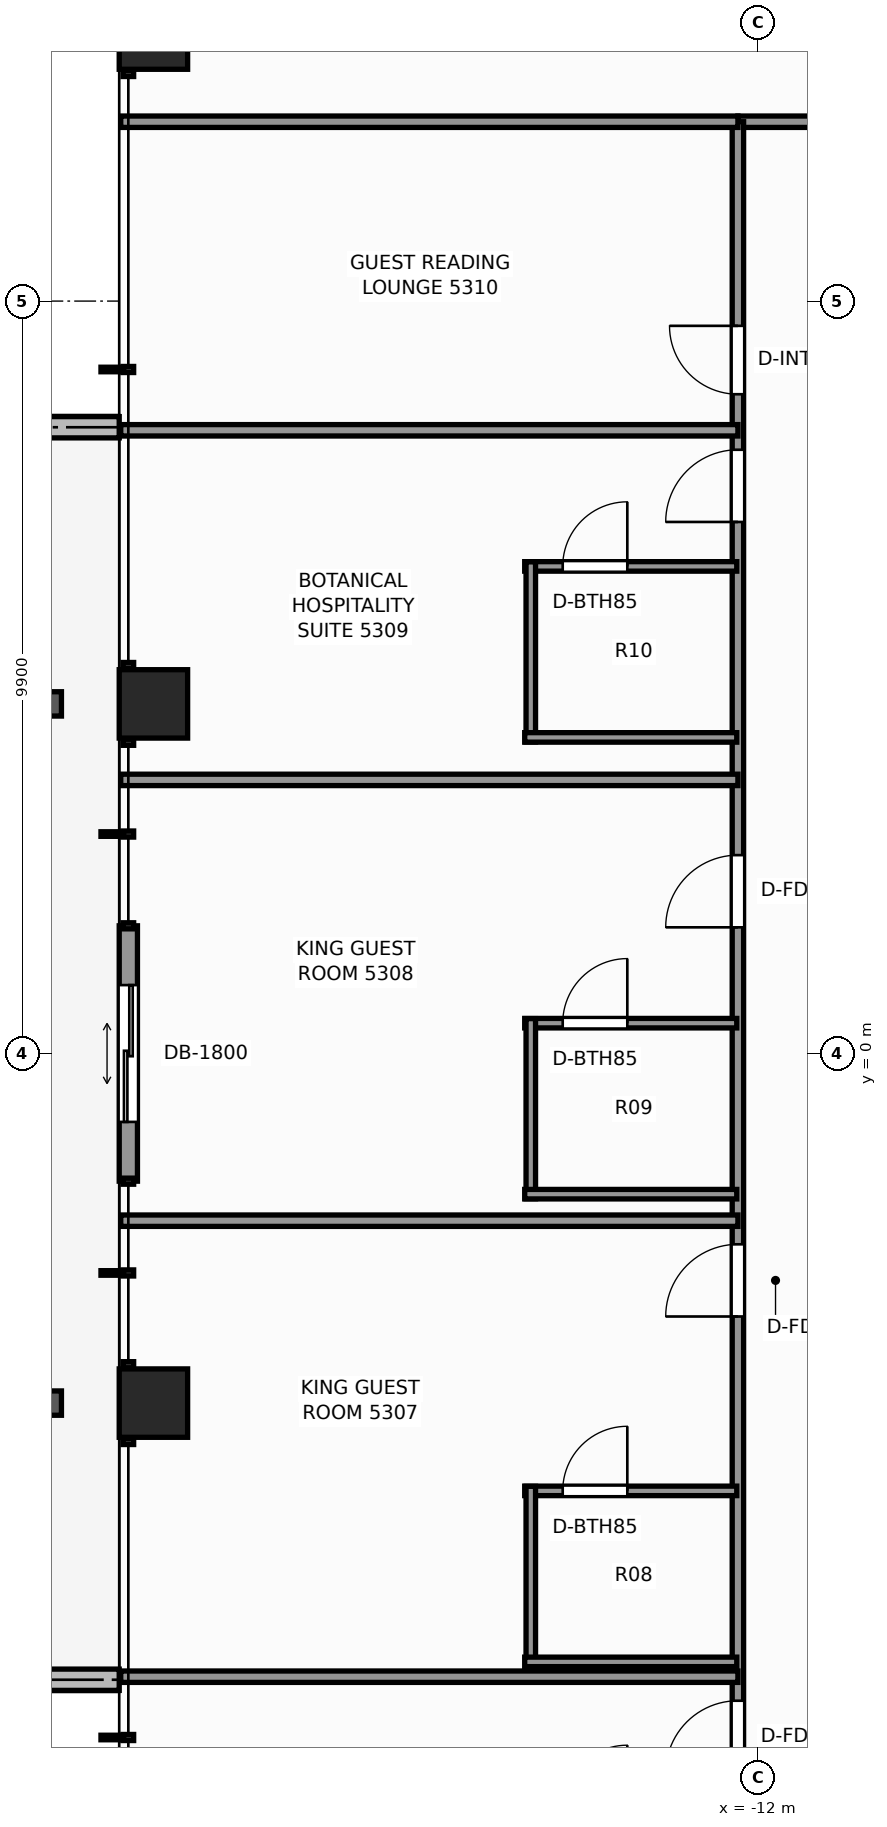
"""IFC4 building model, lengths in metres.
Left out: names, types, materials, properties, quantities, classifications, styles, units other than length and angle.
Written with IfcOpenShell. Run it as: python <this file> out.ifc"""

import sys

from ifc_helpers import new_model, si_unit, direction, frame, frame_2d, origin, origin_2d, place, context, subcontext, project, spatial, rectangle, extrude, element, fill, save


model = new_model("IFC4")
c1 = context("Model", 3, precision=1e-05, world=origin(), true_north=direction((0.0, 1.0)))
c2 = subcontext(c1, "Body", "Model", "MODEL_VIEW")
j1 = project(units=[si_unit("LENGTHUNIT", "METRE"), si_unit("PLANEANGLEUNIT", "RADIAN")], contexts=[c1])
p1 = place(None, origin())
s1 = spatial("IfcSite", under=j1, at=p1, CompositionType="ELEMENT")
p2 = place(p1, origin())
s2 = spatial("IfcBuilding", under=s1, at=p2, CompositionType="ELEMENT")
p3 = place(p2, frame((0.0, 0.0, 183.3)))
s3 = spatial("IfcBuildingStorey", under=s2, at=p3, CompositionType="ELEMENT", Elevation=183.3)
for number, where, z_axis, x_axis in (
    (1, (-19.95, -4.6, 0.0), (0.0, 0.0, 1.0), (1.0, 0.0, 0.0)),
    (2, (-19.95, 4.6, 0.0), (0.0, 0.0, 1.0), (1.0, 0.0, 0.0)),
    (3, (-19.95, 13.4, 0.0), (0.0, 0.0, 1.0), (1.0, 0.0, 0.0)),
):
    element("IfcColumn", number, at=place(p3, frame(where, z_axis=z_axis, x_axis=x_axis)), inside=s3, PredefinedType="COLUMN", context=c2, shape_type="SweptSolid", body=[
        extrude(rectangle(XDim=0.9, YDim=0.9, at=origin_2d()), origin(), (0.0, 0.0, 1.0), 3.3),
    ])
p4 = place(p3, frame((-23.614, -8.24, -0.04), z_axis=(0.0, 0.0, 1.0), x_axis=(1.0, 0.0, 0.0)))
e4 = element("IfcWall", 4, at=p4, inside=s3, PredefinedType="PARAPET", context=c2, shape_type="SweptSolid", body=[
    extrude(rectangle(XDim=3.214, YDim=0.28, at=frame_2d((1.607, 0.0))), origin(), (0.0, 0.0, 1.0), 0.42),
])
p5 = place(p3, frame((-20.4, 8.24, -0.04), z_axis=(0.0, 0.0, 1.0), x_axis=(-1.0, 0.0, 0.0)))
e5 = element("IfcWall", 5, at=p5, inside=s3, PredefinedType="PARAPET", context=c2, shape_type="SweptSolid", body=[
    extrude(rectangle(XDim=3.42, YDim=0.28, at=frame_2d((1.71, 0.0))), origin(), (0.0, 0.0, 1.0), 0.42),
])
p6 = place(p3, frame((-20.28, -1.68, 0.0), z_axis=(0.0, 0.0, 1.0), x_axis=(0.0, 1.0, 0.0)))
e6 = element("IfcWall", 6, at=p6, inside=s3, PredefinedType="STANDARD", context=c2, shape_type="SweptSolid", body=[
    extrude(rectangle(XDim=3.36, YDim=0.24, at=frame_2d((1.68, 0.0))), origin(), (0.0, 0.0, 1.0), 3.08),
])
p7 = place(p6, frame((0.78, 0.0, 0.0)))
e7 = element("IfcOpeningElement", 7, at=p7, cuts=e6, PredefinedType="OPENING", context=c2, shape_type="SweptSolid", body=[
    extrude(rectangle(XDim=1.8, YDim=2.2, at=frame_2d((0.9, 1.1))), frame((0.0, 0.13, 0.0), z_axis=(0.0, -1.0, 0.0), x_axis=(1.0, 0.0, 0.0)), (0.0, 0.0, 1.0), 0.26),
])
p8 = place(p3, frame((-12.26, 12.26, 0.0), z_axis=(0.0, 0.0, 1.0), x_axis=(1.0, 0.0, 0.0)))
e8 = element("IfcWall", 8, at=p8, inside=s3, PredefinedType="PARTITIONING", context=c2, shape_type="SweptSolid", body=[
    extrude(rectangle(XDim=24.84, YDim=0.15, at=frame_2d((12.42, 0.0))), origin(), (0.0, 0.0, 1.0), 2.369),
])
p9 = place(p8, frame((4.275, 0.0, 0.0)))
e9 = element("IfcOpeningElement", 9, at=p9, cuts=e8, PredefinedType="OPENING", context=c2, shape_type="SweptSolid", body=[
    extrude(rectangle(XDim=0.9, YDim=2.06, at=frame_2d((0.45, 1.03))), frame((0.0, 0.085, 0.0), z_axis=(0.0, -1.0, 0.0), x_axis=(1.0, 0.0, 0.0)), (0.0, 0.0, 1.0), 0.17),
])
p10 = place(p8, frame((19.345, 0.0, 0.0)))
e10 = element("IfcOpeningElement", 10, at=p10, cuts=e8, PredefinedType="OPENING", context=c2, shape_type="SweptSolid", body=[
    extrude(rectangle(XDim=0.9, YDim=2.06, at=frame_2d((0.45, 1.03))), frame((0.0, 0.085, 0.0), z_axis=(0.0, -1.0, 0.0), x_axis=(1.0, 0.0, 0.0)), (0.0, 0.0, 1.0), 0.17),
])
p11 = place(p3, frame((-12.26, -12.58, 0.0), z_axis=(0.0, 0.0, 1.0), x_axis=(0.0, 1.0, 0.0)))
e11 = element("IfcWall", 11, at=p11, inside=s3, PredefinedType="PARTITIONING", context=c2, shape_type="SweptSolid", body=[
    extrude(rectangle(XDim=24.84, YDim=0.15, at=frame_2d((12.42, 0.0))), origin(), (0.0, 0.0, 1.0), 2.369),
])
p12 = place(p11, frame((3.114, 0.0, 0.0)))
e12 = element("IfcOpeningElement", 12, at=p12, cuts=e11, PredefinedType="OPENING", context=c2, shape_type="SweptSolid", body=[
    extrude(rectangle(XDim=0.95, YDim=2.06, at=frame_2d((0.475, 1.03))), frame((0.0, 0.085, 0.0), z_axis=(0.0, -1.0, 0.0), x_axis=(1.0, 0.0, 0.0)), (0.0, 0.0, 1.0), 0.17),
])
p13 = place(p11, frame((9.119, 0.0, 0.0)))
e13 = element("IfcOpeningElement", 13, at=p13, cuts=e11, PredefinedType="OPENING", context=c2, shape_type="SweptSolid", body=[
    extrude(rectangle(XDim=0.95, YDim=2.06, at=frame_2d((0.475, 1.03))), frame((0.0, 0.085, 0.0), z_axis=(0.0, -1.0, 0.0), x_axis=(1.0, 0.0, 0.0)), (0.0, 0.0, 1.0), 0.17),
])
p14 = place(p11, frame((14.24, 0.0, 0.0)))
e14 = element("IfcOpeningElement", 14, at=p14, cuts=e11, PredefinedType="OPENING", context=c2, shape_type="SweptSolid", body=[
    extrude(rectangle(XDim=0.95, YDim=2.06, at=frame_2d((0.475, 1.03))), frame((0.0, 0.085, 0.0), z_axis=(0.0, -1.0, 0.0), x_axis=(1.0, 0.0, 0.0)), (0.0, 0.0, 1.0), 0.17),
])
p15 = place(p11, frame((19.574, 0.0, 0.0)))
e15 = element("IfcOpeningElement", 15, at=p15, cuts=e11, PredefinedType="OPENING", context=c2, shape_type="SweptSolid", body=[
    extrude(rectangle(XDim=0.95, YDim=2.06, at=frame_2d((0.475, 1.03))), frame((0.0, 0.085, 0.0), z_axis=(0.0, -1.0, 0.0), x_axis=(1.0, 0.0, 0.0)), (0.0, 0.0, 1.0), 0.17),
])
p16 = place(p11, frame((21.254, 0.0, 0.0)))
e16 = element("IfcOpeningElement", 16, at=p16, cuts=e11, PredefinedType="OPENING", context=c2, shape_type="SweptSolid", body=[
    extrude(rectangle(XDim=0.9, YDim=2.06, at=frame_2d((0.45, 1.03))), frame((0.0, 0.085, 0.0), z_axis=(0.0, -1.0, 0.0), x_axis=(1.0, 0.0, 0.0)), (0.0, 0.0, 1.0), 0.17),
])
p17 = place(p3, frame((-20.38, 12.26, 0.0), z_axis=(0.0, 0.0, 1.0), x_axis=(1.0, 0.0, 0.0)))
e17 = element("IfcWall", 17, at=p17, inside=s3, PredefinedType="PARTITIONING", context=c2, shape_type="SweptSolid", body=[
    extrude(rectangle(XDim=8.12, YDim=0.15, at=frame_2d((4.06, 0.0))), origin(), (0.0, 0.0, 1.0), 2.369),
])
for number, where, z_axis, x_axis in (
    (18, (-20.38, -8.2, 0.0), (0.0, 0.0, 1.0), (1.0, 0.0, 0.0)),
    (19, (-20.38, -2.2, 0.0), (0.0, 0.0, 1.0), (1.0, 0.0, 0.0)),
):
    element("IfcWall", number, at=place(p3, frame(where, z_axis=z_axis, x_axis=x_axis)), inside=s3, PredefinedType="PARTITIONING", context=c2, shape_type="SweptSolid", body=[
        extrude(rectangle(XDim=8.12, YDim=0.15, at=frame_2d((4.06, 0.0))), origin(), (0.0, 0.0, 1.0), 2.453),
    ])
p18 = place(p3, frame((-15.065, -5.755, 0.0), z_axis=(0.0, 0.0, 1.0), x_axis=(1.0, 0.0, 0.0)))
e20 = element("IfcWall", 20, at=p18, inside=s3, PredefinedType="PARTITIONING", context=c2, shape_type="SweptSolid", body=[
    extrude(rectangle(XDim=2.79, YDim=0.125, at=frame_2d((1.395, 0.0))), origin(), (0.0, 0.0, 1.0), 3.08),
])
p19 = place(p18, frame((0.5, 0.0, 0.0)))
e21 = element("IfcOpeningElement", 21, at=p19, cuts=e20, PredefinedType="OPENING", context=c2, shape_type="SweptSolid", body=[
    extrude(rectangle(XDim=0.85, YDim=2.03, at=frame_2d((0.425, 1.015))), frame((0.0, 0.073, 0.0), z_axis=(0.0, -1.0, 0.0), x_axis=(1.0, 0.0, 0.0)), (0.0, 0.0, 1.0), 0.145),
])
p20 = place(p3, frame((-14.985, -8.065, 0.0), z_axis=(0.0, 0.0, 1.0), x_axis=(0.0, 1.0, 0.0)))
e22 = element("IfcWall", 22, at=p20, inside=s3, PredefinedType="PARTITIONING", context=c2, shape_type="SweptSolid", body=[
    extrude(rectangle(XDim=2.37, YDim=0.125, at=frame_2d((1.185, 0.0))), origin(), (0.0, 0.0, 1.0), 3.08),
])
p21 = place(p3, frame((-15.065, -8.005, 0.0), z_axis=(0.0, 0.0, 1.0), x_axis=(1.0, 0.0, 0.0)))
e23 = element("IfcWall", 23, at=p21, inside=s3, PredefinedType="PARTITIONING", context=c2, shape_type="SweptSolid", body=[
    extrude(rectangle(XDim=2.79, YDim=0.125, at=frame_2d((1.395, 0.0))), origin(), (0.0, 0.0, 1.0), 3.08),
])
p22 = place(p3, frame((-20.38, 3.6, 0.0), z_axis=(0.0, 0.0, 1.0), x_axis=(1.0, 0.0, 0.0)))
e24 = element("IfcWall", 24, at=p22, inside=s3, PredefinedType="PARTITIONING", context=c2, shape_type="SweptSolid", body=[
    extrude(rectangle(XDim=8.12, YDim=0.15, at=frame_2d((4.06, 0.0))), origin(), (0.0, 0.0, 1.0), 2.453),
])
p23 = place(p3, frame((-15.065, 0.399, 0.0), z_axis=(0.0, 0.0, 1.0), x_axis=(1.0, 0.0, 0.0)))
e25 = element("IfcWall", 25, at=p23, inside=s3, PredefinedType="PARTITIONING", context=c2, shape_type="SweptSolid", body=[
    extrude(rectangle(XDim=2.79, YDim=0.125, at=frame_2d((1.395, 0.0))), origin(), (0.0, 0.0, 1.0), 3.08),
])
p24 = place(p23, frame((0.5, 0.0, 0.0)))
e26 = element("IfcOpeningElement", 26, at=p24, cuts=e25, PredefinedType="OPENING", context=c2, shape_type="SweptSolid", body=[
    extrude(rectangle(XDim=0.85, YDim=2.03, at=frame_2d((0.425, 1.015))), frame((0.0, 0.073, 0.0), z_axis=(0.0, -1.0, 0.0), x_axis=(1.0, 0.0, 0.0)), (0.0, 0.0, 1.0), 0.145),
])
p25 = place(p3, frame((-14.985, -1.911, 0.0), z_axis=(0.0, 0.0, 1.0), x_axis=(0.0, 1.0, 0.0)))
e27 = element("IfcWall", 27, at=p25, inside=s3, PredefinedType="PARTITIONING", context=c2, shape_type="SweptSolid", body=[
    extrude(rectangle(XDim=2.37, YDim=0.125, at=frame_2d((1.185, 0.0))), origin(), (0.0, 0.0, 1.0), 2.605),
])
p26 = place(p3, frame((-15.065, -1.851, 0.0), z_axis=(0.0, 0.0, 1.0), x_axis=(1.0, 0.0, 0.0)))
e28 = element("IfcWall", 28, at=p26, inside=s3, PredefinedType="PARTITIONING", context=c2, shape_type="SweptSolid", body=[
    extrude(rectangle(XDim=2.79, YDim=0.125, at=frame_2d((1.395, 0.0))), origin(), (0.0, 0.0, 1.0), 3.08),
])
p27 = place(p3, frame((-20.38, 8.2, 0.0), z_axis=(0.0, 0.0, 1.0), x_axis=(1.0, 0.0, 0.0)))
e29 = element("IfcWall", 29, at=p27, inside=s3, PredefinedType="PARTITIONING", context=c2, shape_type="SweptSolid", body=[
    extrude(rectangle(XDim=8.12, YDim=0.15, at=frame_2d((4.06, 0.0))), origin(), (0.0, 0.0, 1.0), 2.453),
])
p28 = place(p3, frame((-15.065, 6.409, 0.0), z_axis=(0.0, 0.0, 1.0), x_axis=(1.0, 0.0, 0.0)))
e30 = element("IfcWall", 30, at=p28, inside=s3, PredefinedType="PARTITIONING", context=c2, shape_type="SweptSolid", body=[
    extrude(rectangle(XDim=2.79, YDim=0.125, at=frame_2d((1.395, 0.0))), origin(), (0.0, 0.0, 1.0), 3.08),
])
p29 = place(p28, frame((0.5, 0.0, 0.0)))
e31 = element("IfcOpeningElement", 31, at=p29, cuts=e30, PredefinedType="OPENING", context=c2, shape_type="SweptSolid", body=[
    extrude(rectangle(XDim=0.85, YDim=2.03, at=frame_2d((0.425, 1.015))), frame((0.0, 0.073, 0.0), z_axis=(0.0, -1.0, 0.0), x_axis=(1.0, 0.0, 0.0)), (0.0, 0.0, 1.0), 0.145),
])
p30 = place(p3, frame((-14.985, 4.099, 0.0), z_axis=(0.0, 0.0, 1.0), x_axis=(0.0, 1.0, 0.0)))
e32 = element("IfcWall", 32, at=p30, inside=s3, PredefinedType="PARTITIONING", context=c2, shape_type="SweptSolid", body=[
    extrude(rectangle(XDim=2.37, YDim=0.125, at=frame_2d((1.185, 0.0))), origin(), (0.0, 0.0, 1.0), 2.369),
])
p31 = place(p3, frame((-15.065, 4.159, 0.0), z_axis=(0.0, 0.0, 1.0), x_axis=(1.0, 0.0, 0.0)))
e33 = element("IfcWall", 33, at=p31, inside=s3, PredefinedType="PARTITIONING", context=c2, shape_type="SweptSolid", body=[
    extrude(rectangle(XDim=2.79, YDim=0.125, at=frame_2d((1.395, 0.0))), origin(), (0.0, 0.0, 1.0), 3.08),
])
p32 = place(p7, origin())
e34 = element("IfcDoor", 34, at=p32, inside=s3, OperationType="DOUBLE_DOOR_SLIDING", PredefinedType="DOOR", context=c2, shape_type="SweptSolid", body=[
    extrude(rectangle(XDim=1.8, YDim=2.2, at=frame_2d((0.9, 1.1))), frame((0.0, 0.025, 0.0), z_axis=(0.0, -1.0, 0.0), x_axis=(1.0, 0.0, 0.0)), (0.0, 0.0, 1.0), 0.05),
])
fill(e7, e34)
p33 = place(p12, origin())
e35 = element("IfcDoor", 35, at=p33, inside=s3, OperationType="SINGLE_SWING_LEFT", PredefinedType="DOOR", context=c2, shape_type="SweptSolid", body=[
    extrude(rectangle(XDim=0.95, YDim=2.06, at=frame_2d((0.475, 1.03))), frame((0.0, 0.025, 0.0), z_axis=(0.0, -1.0, 0.0), x_axis=(1.0, 0.0, 0.0)), (0.0, 0.0, 1.0), 0.05),
])
fill(e12, e35)
p34 = place(p19, origin())
e36 = element("IfcDoor", 36, at=p34, inside=s3, OperationType="SINGLE_SWING_RIGHT", PredefinedType="DOOR", context=c2, shape_type="SweptSolid", body=[
    extrude(rectangle(XDim=0.85, YDim=2.03, at=frame_2d((0.425, 1.015))), frame((0.0, 0.025, 0.0), z_axis=(0.0, -1.0, 0.0), x_axis=(1.0, 0.0, 0.0)), (0.0, 0.0, 1.0), 0.05),
])
fill(e21, e36)
p35 = place(p13, origin())
e37 = element("IfcDoor", 37, at=p35, inside=s3, OperationType="SINGLE_SWING_LEFT", PredefinedType="DOOR", context=c2, shape_type="SweptSolid", body=[
    extrude(rectangle(XDim=0.95, YDim=2.06, at=frame_2d((0.475, 1.03))), frame((0.0, 0.025, 0.0), z_axis=(0.0, -1.0, 0.0), x_axis=(1.0, 0.0, 0.0)), (0.0, 0.0, 1.0), 0.05),
])
fill(e13, e37)
p36 = place(p24, origin())
e38 = element("IfcDoor", 38, at=p36, inside=s3, OperationType="SINGLE_SWING_RIGHT", PredefinedType="DOOR", context=c2, shape_type="SweptSolid", body=[
    extrude(rectangle(XDim=0.85, YDim=2.03, at=frame_2d((0.425, 1.015))), frame((0.0, 0.025, 0.0), z_axis=(0.0, -1.0, 0.0), x_axis=(1.0, 0.0, 0.0)), (0.0, 0.0, 1.0), 0.05),
])
fill(e26, e38)
p37 = place(p14, origin())
e39 = element("IfcDoor", 39, at=p37, inside=s3, OperationType="SINGLE_SWING_LEFT", PredefinedType="DOOR", context=c2, shape_type="SweptSolid", body=[
    extrude(rectangle(XDim=0.95, YDim=2.06, at=frame_2d((0.475, 1.03))), frame((0.0, 0.025, 0.0), z_axis=(0.0, -1.0, 0.0), x_axis=(1.0, 0.0, 0.0)), (0.0, 0.0, 1.0), 0.05),
])
fill(e14, e39)
p38 = place(p29, origin())
e40 = element("IfcDoor", 40, at=p38, inside=s3, OperationType="SINGLE_SWING_RIGHT", PredefinedType="DOOR", context=c2, shape_type="SweptSolid", body=[
    extrude(rectangle(XDim=0.85, YDim=2.03, at=frame_2d((0.425, 1.015))), frame((0.0, 0.025, 0.0), z_axis=(0.0, -1.0, 0.0), x_axis=(1.0, 0.0, 0.0)), (0.0, 0.0, 1.0), 0.05),
])
fill(e31, e40)
p39 = place(p15, origin())
e41 = element("IfcDoor", 41, at=p39, inside=s3, OperationType="SINGLE_SWING_LEFT", PredefinedType="DOOR", context=c2, shape_type="SweptSolid", body=[
    extrude(rectangle(XDim=0.95, YDim=2.06, at=frame_2d((0.475, 1.03))), frame((0.0, 0.025, 0.0), z_axis=(0.0, -1.0, 0.0), x_axis=(1.0, 0.0, 0.0)), (0.0, 0.0, 1.0), 0.05),
])
fill(e15, e41)
p40 = place(p16, origin())
e42 = element("IfcDoor", 42, at=p40, inside=s3, OperationType="SINGLE_SWING_RIGHT", PredefinedType="DOOR", context=c2, shape_type="SweptSolid", body=[
    extrude(rectangle(XDim=0.9, YDim=2.06, at=frame_2d((0.45, 1.03))), frame((0.0, 0.025, 0.0), z_axis=(0.0, -1.0, 0.0), x_axis=(1.0, 0.0, 0.0)), (0.0, 0.0, 1.0), 0.05),
])
fill(e16, e42)
save(model, sys.argv[1])
